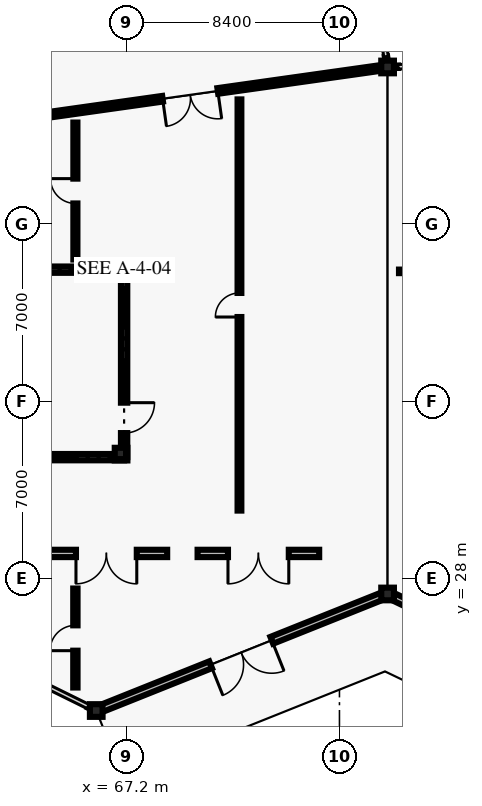
"""IFC4 building model, lengths in metres.
Left out: names, types, materials, properties, quantities, classifications, styles, units other than length and angle.
Written with IfcOpenShell. Run it as: python <this file> out.ifc"""

import sys

from ifc_helpers import new_model, si_unit, direction, frame, frame_2d, origin, origin_2d, place, context, subcontext, project, spatial, rectangle, i_section, extrude, element, fill, save


model = new_model("IFC4")
c1 = context("Model", 3, precision=1e-05, world=origin(), true_north=direction((0.0, 1.0)))
c2 = subcontext(c1, "Body", "Model", "MODEL_VIEW")
j1 = project(units=[si_unit("LENGTHUNIT", "METRE"), si_unit("PLANEANGLEUNIT", "RADIAN")], contexts=[c1])
p1 = place(None, origin())
s1 = spatial("IfcSite", under=j1, at=p1, CompositionType="ELEMENT")
p2 = place(p1, origin())
s2 = spatial("IfcBuilding", under=s1, at=p2, CompositionType="ELEMENT")
p3 = place(p2, origin())
s3 = spatial("IfcBuildingStorey", under=s2, at=p3, CompositionType="ELEMENT", Elevation=0.0)
for number, where, z_axis, x_axis in (
    (1, (66.0, 22.8, 0.0), (0.0, 0.0, 1.0), (1.0, 0.0, 0.0)),
    (2, (77.5, 27.4, 0.0), (0.0, 0.0, 1.0), (1.0, 0.0, 0.0)),
    (3, (77.5, 48.2, 0.0), (0.0, 0.0, 1.0), (1.0, 0.0, 0.0)),
    (4, (66.98, 32.92, 0.0), (0.0, 0.0, 1.0), (1.0, 0.0, 0.0)),
    (5, (66.98, 40.08, 0.0), (0.0, 0.0, 1.0), (1.0, 0.0, 0.0)),
):
    element("IfcColumn", number, at=place(p3, frame(where, z_axis=z_axis, x_axis=x_axis)), inside=s3, PredefinedType="COLUMN", context=c2, shape_type="SweptSolid", body=[
        extrude(i_section(OverallWidth=0.5, OverallDepth=0.5, WebThickness=0.022, FlangeThickness=0.036, at=origin_2d()), origin(), (0.0, 0.0, 1.0), 5.4),
    ])
p4 = place(p3, frame((65.962, 22.819, 0.0), z_axis=(0.0, 0.0, 1.0), x_axis=(-0.896952807524, 0.44212629539, 0.0)))
e6 = element("IfcWall", 6, at=p4, inside=s3, PredefinedType="SOLIDWALL", context=c2, shape_type="SweptSolid", body=[
    extrude(rectangle(XDim=0.308, YDim=0.095, at=frame_2d((0.154, 0.0))), origin(), (0.0, 0.0, 1.0), 4.22),
])
p5 = place(p3, frame((77.444, 27.378, 0.0), z_axis=(0.0, 0.0, 1.0), x_axis=(-0.928469860605, -0.371407751599, 0.0)))
e7 = element("IfcWall", 7, at=p5, inside=s3, PredefinedType="SOLIDWALL", context=c2, shape_type="SweptSolid", body=[
    extrude(rectangle(XDim=12.326, YDim=0.29, at=frame_2d((6.163, 0.0))), origin(), (0.0, 0.0, 1.0), 4.22),
])
p6 = place(p5, frame((4.863, 0.0, 0.0)))
e8 = element("IfcOpeningElement", 8, at=p6, cuts=e7, PredefinedType="OPENING", context=c2, shape_type="SweptSolid", body=[
    extrude(rectangle(XDim=2.6, YDim=2.55, at=frame_2d((1.3, 1.275))), frame((0.0, 0.155, 0.0), z_axis=(0.0, -1.0, 0.0), x_axis=(1.0, 0.0, 0.0)), (0.0, 0.0, 1.0), 0.31),
])
p7 = place(p3, frame((87.5, 22.6, 0.0), z_axis=(0.0, 0.0, 1.0), x_axis=(-0.901529273173, 0.432718117961, 0.0)))
e9 = element("IfcWall", 9, at=p7, inside=s3, PredefinedType="SOLIDWALL", context=c2, shape_type="SweptSolid", body=[
    extrude(rectangle(XDim=11.032, YDim=0.29, at=frame_2d((5.516, 0.0))), origin(), (0.0, 0.0, 1.0), 4.22),
])
p8 = place(p7, frame((4.266, 0.0, 0.0)))
e10 = element("IfcOpeningElement", 10, at=p8, cuts=e9, PredefinedType="OPENING", context=c2, shape_type="SweptSolid", body=[
    extrude(rectangle(XDim=2.5, YDim=2.45, at=frame_2d((1.25, 1.225))), frame((0.0, 0.155, 0.0), z_axis=(0.0, -1.0, 0.0), x_axis=(1.0, 0.0, 0.0)), (0.0, 0.0, 1.0), 0.31),
])
p9 = place(p3, frame((77.602, 48.202, 0.0), z_axis=(0.0, 0.0, 1.0), x_axis=(0.999735659566, 0.022991541735, 0.0)))
e11 = element("IfcWall", 11, at=p9, inside=s3, PredefinedType="SOLIDWALL", context=c2, shape_type="SweptSolid", body=[
    extrude(rectangle(XDim=0.308, YDim=0.095, at=frame_2d((0.154, 0.0))), origin(), (0.0, 0.0, 1.0), 4.22),
])
p10 = place(p3, frame((77.439, 48.605, 0.0), z_axis=(0.0, 0.0, 1.0), x_axis=(0.15008766182, -0.988672692942, 0.0)))
e12 = element("IfcWall", 12, at=p10, inside=s3, PredefinedType="SOLIDWALL", context=c2, shape_type="SweptSolid", body=[
    extrude(rectangle(XDim=0.307, YDim=0.095, at=frame_2d((0.154, 0.0))), origin(), (0.0, 0.0, 1.0), 4.22),
])
p11 = place(p3, frame((68.8, 29.0, 0.0), z_axis=(0.0, 0.0, 1.0), x_axis=(-1.0, 0.0, 0.0)))
e13 = element("IfcWall", 13, at=p11, inside=s3, PredefinedType="SOLIDWALL", context=c2, shape_type="SweptSolid", body=[
    extrude(rectangle(XDim=4.8, YDim=0.29, at=frame_2d((2.4, 0.0))), origin(), (0.0, 0.0, 1.0), 4.4),
])
p12 = place(p11, frame((1.2, 0.0, 0.0)))
e14 = element("IfcOpeningElement", 14, at=p12, cuts=e13, PredefinedType="OPENING", context=c2, shape_type="SweptSolid", body=[
    extrude(rectangle(XDim=2.4, YDim=2.55, at=frame_2d((1.2, 1.275))), frame((0.0, 0.155, 0.0), z_axis=(0.0, -1.0, 0.0), x_axis=(1.0, 0.0, 0.0)), (0.0, 0.0, 1.0), 0.31),
])
p13 = place(p3, frame((74.8, 29.0, 0.0), z_axis=(0.0, 0.0, 1.0), x_axis=(-1.0, 0.0, 0.0)))
e15 = element("IfcWall", 15, at=p13, inside=s3, PredefinedType="SOLIDWALL", context=c2, shape_type="SweptSolid", body=[
    extrude(rectangle(XDim=4.8, YDim=0.29, at=frame_2d((2.4, 0.0))), origin(), (0.0, 0.0, 1.0), 4.4),
])
p14 = place(p13, frame((1.2, 0.0, 0.0)))
e16 = element("IfcOpeningElement", 16, at=p14, cuts=e15, PredefinedType="OPENING", context=c2, shape_type="SweptSolid", body=[
    extrude(rectangle(XDim=2.4, YDim=2.55, at=frame_2d((1.2, 1.275))), frame((0.0, 0.155, 0.0), z_axis=(0.0, -1.0, 0.0), x_axis=(1.0, 0.0, 0.0)), (0.0, 0.0, 1.0), 0.31),
])
p15 = place(p3, frame((77.5, 48.2, 0.0), z_axis=(0.0, 0.0, 1.0), x_axis=(-0.990181159322, -0.139790098807, 0.0)))
e17 = element("IfcWall", 17, at=p15, inside=s3, PredefinedType="SOLIDWALL", context=c2, shape_type="SweptSolid", body=[
    extrude(rectangle(XDim=15.738, YDim=0.225, at=frame_2d((7.869, 0.0))), origin(), (0.0, 0.0, 1.0), 4.62),
])
p16 = place(p15, frame((6.769, 0.0, 0.0)))
e18 = element("IfcOpeningElement", 18, at=p16, cuts=e17, PredefinedType="OPENING", context=c2, shape_type="SweptSolid", body=[
    extrude(rectangle(XDim=2.2, YDim=2.6, at=frame_2d((1.1, 1.3))), frame((0.0, 0.123, 0.0), z_axis=(0.0, -1.0, 0.0), x_axis=(1.0, 0.0, 0.0)), (0.0, 0.0, 1.0), 0.245),
])
p17 = place(p3, frame((65.177, 23.708, 0.0), z_axis=(0.0, 0.0, 1.0), x_axis=(0.0, 1.0, 0.0)))
e19 = element("IfcWall", 19, at=p17, inside=s3, PredefinedType="PARTITIONING", context=c2, shape_type="SweptSolid", body=[
    extrude(rectangle(XDim=3.907, YDim=0.17, at=frame_2d((1.954, 0.0))), origin(), (0.0, 0.0, 1.0), 3.92),
])
p18 = place(p17, frame((1.454, 0.0, 0.0)))
e20 = element("IfcOpeningElement", 20, at=p18, cuts=e19, PredefinedType="OPENING", context=c2, shape_type="SweptSolid", body=[
    extrude(rectangle(XDim=1.0, YDim=2.15, at=frame_2d((0.5, 1.075))), frame((0.0, 0.095, 0.0), z_axis=(0.0, -1.0, 0.0), x_axis=(1.0, 0.0, 0.0)), (0.0, 0.0, 1.0), 0.19),
])
p19 = place(p3, frame((65.177, 40.6, 0.0), z_axis=(0.0, 0.0, 1.0), x_axis=(0.0, 1.0, 0.0)))
e21 = element("IfcWall", 21, at=p19, inside=s3, PredefinedType="PARTITIONING", context=c2, shape_type="SweptSolid", body=[
    extrude(rectangle(XDim=5.406, YDim=0.16, at=frame_2d((2.703, 0.0))), origin(), (0.0, 0.0, 1.0), 3.92),
])
p20 = place(p19, frame((2.213, 0.0, 0.0)))
e22 = element("IfcOpeningElement", 22, at=p20, cuts=e21, PredefinedType="OPENING", context=c2, shape_type="SweptSolid", body=[
    extrude(rectangle(XDim=0.98, YDim=2.15, at=frame_2d((0.49, 1.075))), frame((0.0, 0.09, 0.0), z_axis=(0.0, -1.0, 0.0), x_axis=(1.0, 0.0, 0.0)), (0.0, 0.0, 1.0), 0.18),
])
p21 = place(p3, frame((71.653, 30.691, 0.0), z_axis=(0.0, 0.0, 1.0), x_axis=(0.0, 1.0, 0.0)))
e23 = element("IfcWall", 23, at=p21, inside=s3, PredefinedType="PARTITIONING", context=c2, shape_type="SweptSolid", body=[
    extrude(rectangle(XDim=16.229, YDim=0.15, at=frame_2d((8.115, 0.0))), origin(), (0.0, 0.0, 1.0), 3.92),
])
p22 = place(p21, frame((7.64, 0.0, 0.0)))
e24 = element("IfcOpeningElement", 24, at=p22, cuts=e23, PredefinedType="OPENING", context=c2, shape_type="SweptSolid", body=[
    extrude(rectangle(XDim=0.95, YDim=2.15, at=frame_2d((0.475, 1.075))), frame((0.0, 0.085, 0.0), z_axis=(0.0, -1.0, 0.0), x_axis=(1.0, 0.0, 0.0)), (0.0, 0.0, 1.0), 0.17),
])
p23 = place(p3, frame((77.95, 40.133, 0.0), z_axis=(0.0, 0.0, 1.0), x_axis=(1.0, 0.0, 0.0)))
e25 = element("IfcWall", 25, at=p23, inside=s3, PredefinedType="PARTITIONING", context=c2, shape_type="SweptSolid", body=[
    extrude(rectangle(XDim=22.59, YDim=0.14, at=frame_2d((11.295, 0.0))), origin(), (0.0, 0.0, 1.0), 3.92),
])
p24 = place(p23, frame((10.835, 0.0, 0.0)))
e26 = element("IfcOpeningElement", 26, at=p24, cuts=e25, PredefinedType="OPENING", context=c2, shape_type="SweptSolid", body=[
    extrude(rectangle(XDim=0.92, YDim=2.1, at=frame_2d((0.46, 1.05))), frame((0.0, 0.08, 0.0), z_axis=(0.0, -1.0, 0.0), x_axis=(1.0, 0.0, 0.0)), (0.0, 0.0, 1.0), 0.16),
])
for number, where, z_axis, x_axis in (
    (27, (57.9, 40.2, 0.0), (0.0, 0.0, 1.0), (1.0, 0.0, 0.0)),
    (28, (67.1, 32.8, 0.0), (0.0, 0.0, 1.0), (-1.0, 0.0, 0.0)),
):
    element("IfcWall", number, at=place(p3, frame(where, z_axis=z_axis, x_axis=x_axis)), inside=s3, PredefinedType="SHEAR", context=c2, shape_type="SweptSolid", body=[
        extrude(rectangle(XDim=9.2, YDim=0.25, at=frame_2d((4.6, 0.0))), origin(), (0.0, 0.0, 1.0), 5.16),
    ])
p25 = place(p3, frame((67.1, 40.2, 0.0), z_axis=(0.0, 0.0, 1.0), x_axis=(0.0, -1.0, 0.0)))
e29 = element("IfcWall", 29, at=p25, inside=s3, PredefinedType="SHEAR", context=c2, shape_type="SweptSolid", body=[
    extrude(rectangle(XDim=7.4, YDim=0.25, at=frame_2d((3.7, 0.0))), origin(), (0.0, 0.0, 1.0), 5.16),
])
p26 = place(p25, frame((5.25, 0.0, 0.0)))
e30 = element("IfcOpeningElement", 30, at=p26, cuts=e29, PredefinedType="OPENING", context=c2, shape_type="SweptSolid", body=[
    extrude(rectangle(XDim=1.2, YDim=2.2, at=frame_2d((0.6, 1.1))), frame((0.0, 0.135, 0.0), z_axis=(0.0, -1.0, 0.0), x_axis=(1.0, 0.0, 0.0)), (0.0, 0.0, 1.0), 0.27),
])
p27 = place(p6, origin())
e31 = element("IfcDoor", 31, at=p27, inside=s3, OperationType="DOUBLE_DOOR_SINGLE_SWING", PredefinedType="DOOR", context=c2, shape_type="SweptSolid", body=[
    extrude(rectangle(XDim=2.6, YDim=2.55, at=frame_2d((1.3, 1.275))), frame((0.0, 0.025, 0.0), z_axis=(0.0, -1.0, 0.0), x_axis=(1.0, 0.0, 0.0)), (0.0, 0.0, 1.0), 0.05),
])
fill(e8, e31)
p28 = place(p12, origin())
e32 = element("IfcDoor", 32, at=p28, inside=s3, OperationType="DOUBLE_DOOR_SINGLE_SWING", PredefinedType="DOOR", context=c2, shape_type="SweptSolid", body=[
    extrude(rectangle(XDim=2.4, YDim=2.55, at=frame_2d((1.2, 1.275))), frame((0.0, 0.025, 0.0), z_axis=(0.0, -1.0, 0.0), x_axis=(1.0, 0.0, 0.0)), (0.0, 0.0, 1.0), 0.05),
])
fill(e14, e32)
p29 = place(p14, origin())
e33 = element("IfcDoor", 33, at=p29, inside=s3, OperationType="DOUBLE_DOOR_SINGLE_SWING", PredefinedType="DOOR", context=c2, shape_type="SweptSolid", body=[
    extrude(rectangle(XDim=2.4, YDim=2.55, at=frame_2d((1.2, 1.275))), frame((0.0, 0.025, 0.0), z_axis=(0.0, -1.0, 0.0), x_axis=(1.0, 0.0, 0.0)), (0.0, 0.0, 1.0), 0.05),
])
fill(e16, e33)
p30 = place(p16, origin())
e34 = element("IfcDoor", 34, at=p30, inside=s3, OperationType="DOUBLE_DOOR_SINGLE_SWING", PredefinedType="DOOR", context=c2, shape_type="SweptSolid", body=[
    extrude(rectangle(XDim=2.2, YDim=2.6, at=frame_2d((1.1, 1.3))), frame((0.0, 0.025, 0.0), z_axis=(0.0, -1.0, 0.0), x_axis=(1.0, 0.0, 0.0)), (0.0, 0.0, 1.0), 0.05),
])
fill(e18, e34)
p31 = place(p18, origin())
e35 = element("IfcDoor", 35, at=p31, inside=s3, OperationType="SINGLE_SWING_LEFT", PredefinedType="DOOR", context=c2, shape_type="SweptSolid", body=[
    extrude(rectangle(XDim=1.0, YDim=2.15, at=frame_2d((0.5, 1.075))), frame((0.0, 0.025, 0.0), z_axis=(0.0, -1.0, 0.0), x_axis=(1.0, 0.0, 0.0)), (0.0, 0.0, 1.0), 0.05),
])
fill(e20, e35)
p32 = place(p20, origin())
e36 = element("IfcDoor", 36, at=p32, inside=s3, OperationType="SINGLE_SWING_RIGHT", PredefinedType="DOOR", context=c2, shape_type="SweptSolid", body=[
    extrude(rectangle(XDim=0.98, YDim=2.15, at=frame_2d((0.49, 1.075))), frame((0.0, 0.025, 0.0), z_axis=(0.0, -1.0, 0.0), x_axis=(1.0, 0.0, 0.0)), (0.0, 0.0, 1.0), 0.05),
])
fill(e22, e36)
p33 = place(p22, origin())
e37 = element("IfcDoor", 37, at=p33, inside=s3, OperationType="SINGLE_SWING_LEFT", PredefinedType="DOOR", context=c2, shape_type="SweptSolid", body=[
    extrude(rectangle(XDim=0.95, YDim=2.15, at=frame_2d((0.475, 1.075))), frame((0.0, 0.025, 0.0), z_axis=(0.0, -1.0, 0.0), x_axis=(1.0, 0.0, 0.0)), (0.0, 0.0, 1.0), 0.05),
])
fill(e24, e37)
p34 = place(p26, origin())
e38 = element("IfcDoor", 38, at=p34, inside=s3, OperationType="SINGLE_SWING_LEFT", PredefinedType="DOOR", context=c2, shape_type="SweptSolid", body=[
    extrude(rectangle(XDim=1.2, YDim=2.2, at=frame_2d((0.6, 1.1))), frame((0.0, 0.025, 0.0), z_axis=(0.0, -1.0, 0.0), x_axis=(1.0, 0.0, 0.0)), (0.0, 0.0, 1.0), 0.05),
])
fill(e30, e38)
save(model, sys.argv[1])
